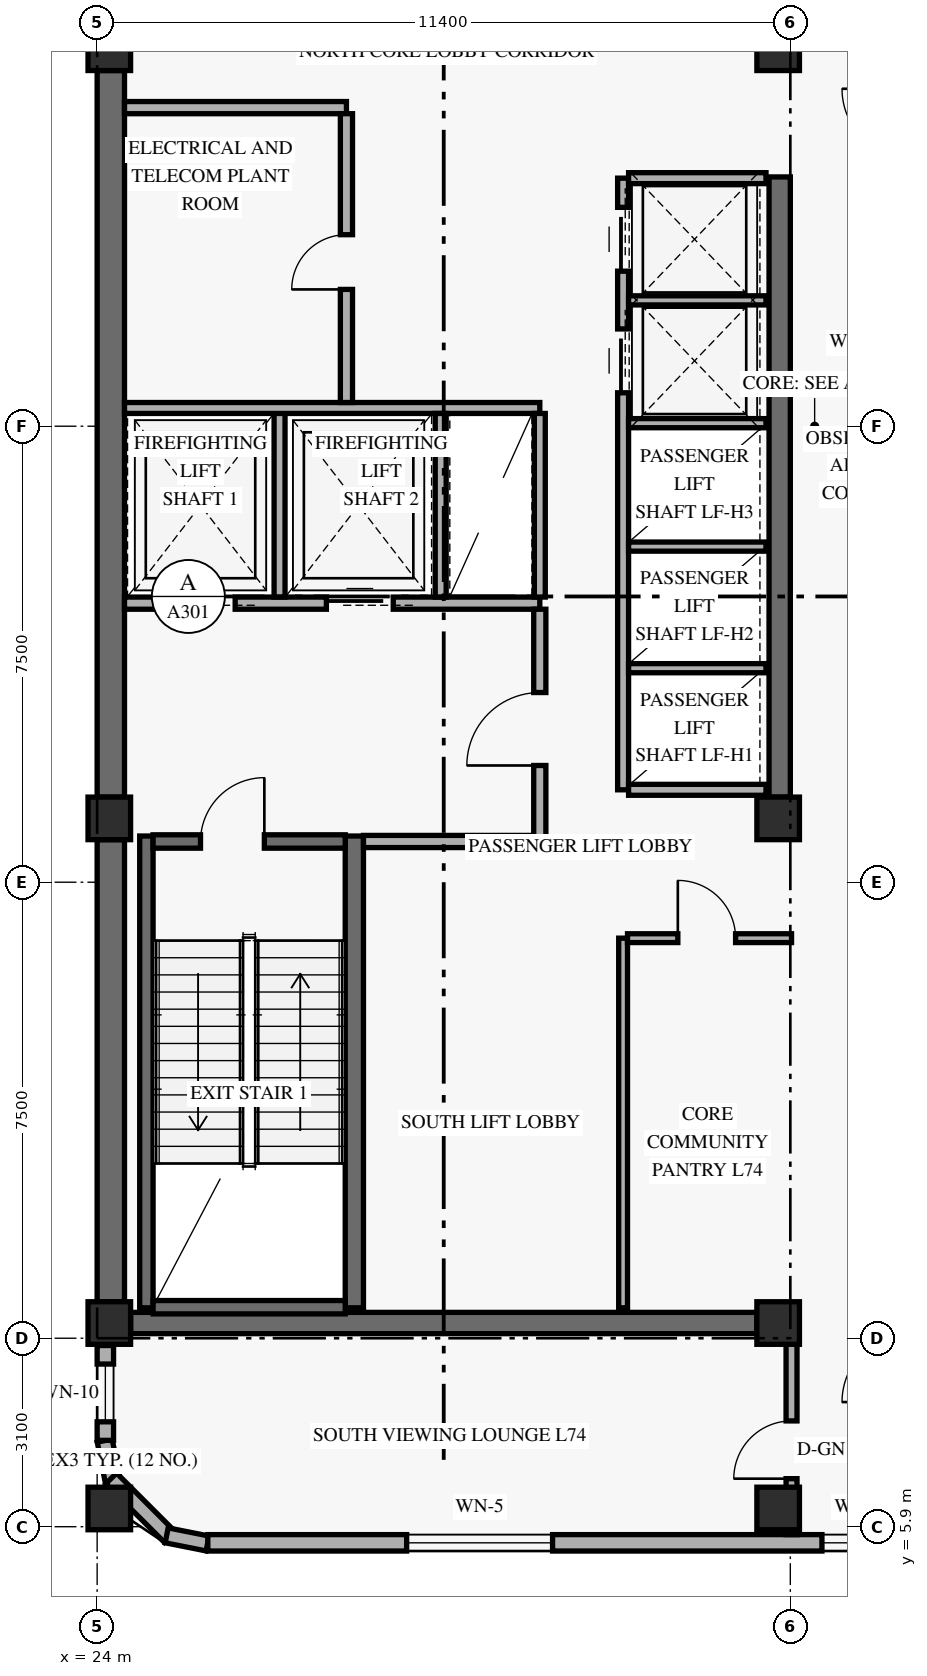
"""IFC4 building model, lengths in metres.
Left out: names, types, materials, properties, quantities, classifications, styles, units other than length and angle.
Written with IfcOpenShell. Run it as: python <this file> out.ifc"""

import sys

from ifc_helpers import new_model, si_unit, direction, frame, frame_2d, origin, origin_2d, place, context, subcontext, project, spatial, rectangle, extrude, element, fill, save


model = new_model("IFC4")
c1 = context("Model", 3, precision=1e-05, world=origin(), true_north=direction((0.0, 1.0)))
c2 = subcontext(c1, "Body", "Model", "MODEL_VIEW")
j1 = project(units=[si_unit("LENGTHUNIT", "METRE"), si_unit("PLANEANGLEUNIT", "RADIAN")], contexts=[c1])
p1 = place(None, origin())
s1 = spatial("IfcSite", under=j1, at=p1, CompositionType="ELEMENT")
p2 = place(p1, origin())
s2 = spatial("IfcBuilding", under=s1, at=p2, CompositionType="ELEMENT")
p3 = place(p2, frame((0.0, 0.0, 282.0)))
s3 = spatial("IfcBuildingStorey", under=s2, at=p3, CompositionType="ELEMENT", Elevation=282.0)
p4 = place(p3, frame((24.225, 9.6, 0.0), z_axis=(0.0, 0.0, 1.0), x_axis=(0.0, 1.0, 0.0)))
e1 = element("IfcWall", 1, at=p4, inside=s3, PredefinedType="SHEAR", context=c2, shape_type="SweptSolid", body=[
    extrude(rectangle(XDim=7.6, YDim=0.45, at=frame_2d((3.8, 0.0))), origin(), (0.0, 0.0, 1.0), 4.161),
])
p5 = place(p3, frame((24.225, 17.9, 0.0), z_axis=(0.0, 0.0, 1.0), x_axis=(0.0, 1.0, 0.0)))
e2 = element("IfcWall", 2, at=p5, inside=s3, PredefinedType="SHEAR", context=c2, shape_type="SweptSolid", body=[
    extrude(rectangle(XDim=11.95, YDim=0.45, at=frame_2d((5.975, 0.0))), origin(), (0.0, 0.0, 1.0), 4.161),
])
p6 = place(p3, frame((35.225, 17.9, 0.0), z_axis=(0.0, 0.0, 1.0), x_axis=(0.0, 1.0, 0.0)))
e3 = element("IfcWall", 3, at=p6, inside=s3, PredefinedType="SHEAR", context=c2, shape_type="SweptSolid", body=[
    extrude(rectangle(XDim=10.2, YDim=0.35, at=frame_2d((5.1, 0.0))), origin(), (0.0, 0.0, 1.0), 4.161),
])
p7 = place(p3, frame((24.55, 9.25, 0.0), z_axis=(0.0, 0.0, 1.0), x_axis=(1.0, 0.0, 0.0)))
e4 = element("IfcWall", 4, at=p7, inside=s3, PredefinedType="SHEAR", context=c2, shape_type="SweptSolid", body=[
    extrude(rectangle(XDim=10.3, YDim=0.35, at=frame_2d((5.15, 0.0))), origin(), (0.0, 0.0, 1.0), 4.7),
])
p8 = place(p3, frame((24.81, 9.5, 0.0), z_axis=(0.0, 0.0, 1.0), x_axis=(0.0, 1.0, 0.0)))
e5 = element("IfcWall", 5, at=p8, inside=s3, PredefinedType="SHEAR", context=c2, shape_type="SweptSolid", body=[
    extrude(rectangle(XDim=7.76, YDim=0.22, at=frame_2d((3.88, 0.0))), origin(), (0.0, 0.0, 1.0), 4.7),
])
p9 = place(p3, frame((28.23, 9.5, 0.0), z_axis=(0.0, 0.0, 1.0), x_axis=(0.0, 1.0, 0.0)))
e6 = element("IfcWall", 6, at=p9, inside=s3, PredefinedType="SHEAR", context=c2, shape_type="SweptSolid", body=[
    extrude(rectangle(XDim=7.76, YDim=0.3, at=frame_2d((3.88, 0.0))), origin(), (0.0, 0.0, 1.0), 4.7),
])
p10 = place(p3, frame((24.92, 9.51, 0.0), z_axis=(0.0, 0.0, 1.0), x_axis=(1.0, 0.0, 0.0)))
e7 = element("IfcWall", 7, at=p10, inside=s3, PredefinedType="SHEAR", context=c2, shape_type="SweptSolid", body=[
    extrude(rectangle(XDim=3.16, YDim=0.22, at=frame_2d((1.58, 0.0))), origin(), (0.0, 0.0, 1.0), 4.7),
])
p11 = place(p3, frame((24.92, 17.17, 0.0), z_axis=(0.0, 0.0, 1.0), x_axis=(1.0, 0.0, 0.0)))
e8 = element("IfcWall", 8, at=p11, inside=s3, PredefinedType="SHEAR", context=c2, shape_type="SweptSolid", body=[
    extrude(rectangle(XDim=3.16, YDim=0.22, at=frame_2d((1.58, 0.0))), origin(), (0.0, 0.0, 1.0), 4.7),
])
p12 = place(p11, frame((0.78, 0.0, 0.0)))
e9 = element("IfcOpeningElement", 9, at=p12, cuts=e8, PredefinedType="OPENING", context=c2, shape_type="SweptSolid", body=[
    extrude(rectangle(XDim=1.05, YDim=2.15, at=frame_2d((0.525, 1.075))), frame((0.0, 0.12, 0.0), z_axis=(0.0, -1.0, 0.0), x_axis=(1.0, 0.0, 0.0)), (0.0, 0.0, 1.0), 0.24),
])
for number, where, z_axis, x_axis in (
    (10, (24.2, 6.2, 0.0), (0.0, 0.0, 1.0), (1.0, 0.0, 0.0)),
    (11, (24.2, 9.25, 0.0), (0.0, 0.0, 1.0), (1.0, 0.0, 0.0)),
    (12, (24.2, 17.55, 0.0), (0.0, 0.0, 1.0), (1.0, 0.0, 0.0)),
    (13, (24.2, 30.2, 0.0), (0.0, 0.0, 1.0), (1.0, 0.0, 0.0)),
    (14, (35.2, 6.2, 0.0), (0.0, 0.0, 1.0), (1.0, 0.0, 0.0)),
    (15, (35.2, 9.25, 0.0), (0.0, 0.0, 1.0), (1.0, 0.0, 0.0)),
    (16, (35.2, 17.55, 0.0), (0.0, 0.0, 1.0), (1.0, 0.0, 0.0)),
    (17, (35.2, 30.2, 0.0), (0.0, 0.0, 1.0), (1.0, 0.0, 0.0)),
):
    element("IfcColumn", number, at=place(p3, frame(where, z_axis=z_axis, x_axis=x_axis)), inside=s3, PredefinedType="COLUMN", context=c2, shape_type="SweptSolid", body=[
        extrude(rectangle(XDim=0.7, YDim=0.7, at=origin_2d()), origin(), (0.0, 0.0, 1.0), 5.0),
    ])
p13 = place(p3, frame((24.124, 7.316, 0.0), z_axis=(0.0, 0.0, 1.0), x_axis=(0.194952956674, -0.980812594069, 0.0)))
e18 = element("IfcWall", 18, at=p13, inside=s3, PredefinedType="SOLIDWALL", context=c2, shape_type="SweptSolid", body=[
    extrude(rectangle(XDim=0.686, YDim=0.25, at=frame_2d((0.343, 0.0))), origin(), (0.0, 0.0, 1.0), 4.143),
])
p14 = place(p3, frame((24.231, 6.694, 0.0), z_axis=(0.0, 0.0, 1.0), x_axis=(0.707106781187, -0.707106781187, 0.0)))
e19 = element("IfcWall", 19, at=p14, inside=s3, PredefinedType="SOLIDWALL", context=c2, shape_type="SweptSolid", body=[
    extrude(rectangle(XDim=1.362, YDim=0.25, at=frame_2d((0.681, 0.0))), origin(), (0.0, 0.0, 1.0), 4.143),
])
p15 = place(p3, frame((25.143, 5.758, 0.0), z_axis=(0.0, 0.0, 1.0), x_axis=(0.980812594069, -0.194952956674, 0.0)))
e20 = element("IfcWall", 20, at=p15, inside=s3, PredefinedType="SOLIDWALL", context=c2, shape_type="SweptSolid", body=[
    extrude(rectangle(XDim=0.686, YDim=0.25, at=frame_2d((0.343, 0.0))), origin(), (0.0, 0.0, 1.0), 4.7),
])
p16 = place(p3, frame((25.82, 5.635, 0.0), z_axis=(0.0, 0.0, 1.0), x_axis=(1.0, 0.0, 0.0)))
e21 = element("IfcWall", 21, at=p16, inside=s3, PredefinedType="SOLIDWALL", context=c2, shape_type="SweptSolid", body=[
    extrude(rectangle(XDim=32.96, YDim=0.27, at=frame_2d((16.48, 0.0))), origin(), (0.0, 0.0, 1.0), 4.7),
])
p17 = place(p16, frame((3.27, 0.0, 0.85)))
e22 = element("IfcOpeningElement", 22, at=p17, cuts=e21, PredefinedType="OPENING", context=c2, shape_type="SweptSolid", body=[
    extrude(rectangle(XDim=2.4, YDim=1.9, at=frame_2d((1.2, 0.95))), frame((0.0, 0.145, 0.0), z_axis=(0.0, -1.0, 0.0), x_axis=(1.0, 0.0, 0.0)), (0.0, 0.0, 1.0), 0.29),
])
p18 = place(p16, frame((10.1, 0.0, 0.85)))
e23 = element("IfcOpeningElement", 23, at=p18, cuts=e21, PredefinedType="OPENING", context=c2, shape_type="SweptSolid", body=[
    extrude(rectangle(XDim=1.2, YDim=1.5, at=frame_2d((0.6, 0.75))), frame((0.0, 0.145, 0.0), z_axis=(0.0, -1.0, 0.0), x_axis=(1.0, 0.0, 0.0)), (0.0, 0.0, 1.0), 0.29),
])
p19 = place(p16, frame((16.407, 0.0, 0.85)))
e24 = element("IfcOpeningElement", 24, at=p19, cuts=e21, PredefinedType="OPENING", context=c2, shape_type="SweptSolid", body=[
    extrude(rectangle(XDim=2.4, YDim=1.9, at=frame_2d((1.2, 0.95))), frame((0.0, 0.145, 0.0), z_axis=(0.0, -1.0, 0.0), x_axis=(1.0, 0.0, 0.0)), (0.0, 0.0, 1.0), 0.29),
])
p20 = place(p3, frame((24.135, 7.32, 0.0), z_axis=(0.0, 0.0, 1.0), x_axis=(0.0, 1.0, 0.0)))
e25 = element("IfcWall", 25, at=p20, inside=s3, PredefinedType="SOLIDWALL", context=c2, shape_type="SweptSolid", body=[
    extrude(rectangle(XDim=1.56, YDim=0.27, at=frame_2d((0.78, 0.0))), origin(), (0.0, 0.0, 1.0), 4.143),
])
p21 = place(p20, frame((0.305, 0.0, 0.85)))
e26 = element("IfcOpeningElement", 26, at=p21, cuts=e25, PredefinedType="OPENING", context=c2, shape_type="SweptSolid", body=[
    extrude(rectangle(XDim=0.95, YDim=1.5, at=frame_2d((0.475, 0.75))), frame((0.0, 0.145, 0.0), z_axis=(0.0, -1.0, 0.0), x_axis=(1.0, 0.0, 0.0)), (0.0, 0.0, 1.0), 0.29),
])
p22 = place(p3, frame((24.45, 21.09, 0.0), z_axis=(0.0, 0.0, 1.0), x_axis=(1.0, 0.0, 0.0)))
e27 = element("IfcWall", 27, at=p22, inside=s3, PredefinedType="STANDARD", context=c2, shape_type="SweptSolid", body=[
    extrude(rectangle(XDim=6.83, YDim=0.2, at=frame_2d((3.415, 0.0))), origin(), (0.0, 0.0, 1.0), 4.7),
])
p23 = place(p22, frame((0.72, 0.0, 0.0)))
e28 = element("IfcOpeningElement", 28, at=p23, cuts=e27, PredefinedType="OPENING", context=c2, shape_type="SweptSolid", body=[
    extrude(rectangle(XDim=1.1, YDim=2.2, at=frame_2d((0.55, 1.1))), frame((0.0, 0.11, 0.0), z_axis=(0.0, -1.0, 0.0), x_axis=(1.0, 0.0, 0.0)), (0.0, 0.0, 1.0), 0.22),
])
p24 = place(p22, frame((3.32, 0.0, 0.0)))
e29 = element("IfcOpeningElement", 29, at=p24, cuts=e27, PredefinedType="OPENING", context=c2, shape_type="SweptSolid", body=[
    extrude(rectangle(XDim=1.1, YDim=2.2, at=frame_2d((0.55, 1.1))), frame((0.0, 0.11, 0.0), z_axis=(0.0, -1.0, 0.0), x_axis=(1.0, 0.0, 0.0)), (0.0, 0.0, 1.0), 0.22),
])
p25 = place(p3, frame((28.38, 17.17, 0.0), z_axis=(0.0, 0.0, 1.0), x_axis=(1.0, 0.0, 0.0)))
e30 = element("IfcWall", 30, at=p25, inside=s3, PredefinedType="STANDARD", context=c2, shape_type="SweptSolid", body=[
    extrude(rectangle(XDim=2.9, YDim=0.2, at=frame_2d((1.45, 0.0))), origin(), (0.0, 0.0, 1.0), 4.7),
])
p26 = place(p3, frame((31.28, 17.07, 0.0), z_axis=(0.0, 0.0, 1.0), x_axis=(0.0, 1.0, 0.0)))
e31 = element("IfcWall", 31, at=p26, inside=s3, PredefinedType="STANDARD", context=c2, shape_type="SweptSolid", body=[
    extrude(rectangle(XDim=3.92, YDim=0.2, at=frame_2d((1.96, 0.0))), origin(), (0.0, 0.0, 1.0), 4.143),
])
p27 = place(p26, frame((1.35, 0.0, 0.0)))
e32 = element("IfcOpeningElement", 32, at=p27, cuts=e31, PredefinedType="OPENING", context=c2, shape_type="SweptSolid", body=[
    extrude(rectangle(XDim=1.2, YDim=2.15, at=frame_2d((0.6, 1.075))), frame((0.0, 0.11, 0.0), z_axis=(0.0, -1.0, 0.0), x_axis=(1.0, 0.0, 0.0)), (0.0, 0.0, 1.0), 0.22),
])
p28 = place(p3, frame((27.0, 21.19, 0.0), z_axis=(0.0, 0.0, 1.0), x_axis=(0.0, 1.0, 0.0)))
e33 = element("IfcWall", 33, at=p28, inside=s3, PredefinedType="STANDARD", context=c2, shape_type="SweptSolid", body=[
    extrude(rectangle(XDim=3.11, YDim=0.18, at=frame_2d((1.555, 0.0))), origin(), (0.0, 0.0, 1.0), 4.7),
])
p29 = place(p3, frame((24.45, 24.3, 0.0), z_axis=(0.0, 0.0, 1.0), x_axis=(1.0, 0.0, 0.0)))
e34 = element("IfcWall", 34, at=p29, inside=s3, PredefinedType="STANDARD", context=c2, shape_type="SweptSolid", body=[
    extrude(rectangle(XDim=6.83, YDim=0.18, at=frame_2d((3.415, 0.0))), origin(), (0.0, 0.0, 1.0), 4.7),
])
for number, where, z_axis, x_axis in (
    (35, (29.65, 21.19, 0.0), (0.0, 0.0, 1.0), (0.0, 1.0, 0.0)),
    (36, (31.28, 21.19, 0.0), (0.0, 0.0, 1.0), (0.0, 1.0, 0.0)),
):
    element("IfcWall", number, at=place(p3, frame(where, z_axis=z_axis, x_axis=x_axis)), inside=s3, PredefinedType="STANDARD", context=c2, shape_type="SweptSolid", body=[
        extrude(rectangle(XDim=3.02, YDim=0.18, at=frame_2d((1.51, 0.0))), origin(), (0.0, 0.0, 1.0), 4.7),
    ])
p30 = place(p3, frame((24.45, 29.24, 0.0), z_axis=(0.0, 0.0, 1.0), x_axis=(1.0, 0.0, 0.0)))
e37 = element("IfcWall", 37, at=p30, inside=s3, PredefinedType="STANDARD", context=c2, shape_type="SweptSolid", body=[
    extrude(rectangle(XDim=3.65, YDim=0.2, at=frame_2d((1.825, 0.0))), origin(), (0.0, 0.0, 1.0), 4.7),
])
p31 = place(p3, frame((28.1, 24.39, 0.0), z_axis=(0.0, 0.0, 1.0), x_axis=(0.0, 1.0, 0.0)))
e38 = element("IfcWall", 38, at=p31, inside=s3, PredefinedType="STANDARD", context=c2, shape_type="SweptSolid", body=[
    extrude(rectangle(XDim=4.75, YDim=0.2, at=frame_2d((2.375, 0.0))), origin(), (0.0, 0.0, 1.0), 4.7),
])
p32 = place(p31, frame((1.86, 0.0, 0.0)))
e39 = element("IfcOpeningElement", 39, at=p32, cuts=e38, PredefinedType="OPENING", context=c2, shape_type="SweptSolid", body=[
    extrude(rectangle(XDim=0.9, YDim=2.1, at=frame_2d((0.45, 1.05))), frame((0.0, 0.11, 0.0), z_axis=(0.0, -1.0, 0.0), x_axis=(1.0, 0.0, 0.0)), (0.0, 0.0, 1.0), 0.22),
])
p33 = place(p3, frame((32.65, 18.02, 0.0), z_axis=(0.0, 0.0, 1.0), x_axis=(0.0, 1.0, 0.0)))
e40 = element("IfcWall", 40, at=p33, inside=s3, PredefinedType="STANDARD", context=c2, shape_type="SweptSolid", body=[
    extrude(rectangle(XDim=10.06, YDim=0.18, at=frame_2d((5.03, 0.0))), origin(), (0.0, 0.0, 1.0), 4.7),
])
p34 = place(p33, frame((6.53, 0.0, 0.0)))
e41 = element("IfcOpeningElement", 41, at=p34, cuts=e40, PredefinedType="OPENING", context=c2, shape_type="SweptSolid", body=[
    extrude(rectangle(XDim=1.05, YDim=2.2, at=frame_2d((0.525, 1.1))), frame((0.0, 0.1, 0.0), z_axis=(0.0, -1.0, 0.0), x_axis=(1.0, 0.0, 0.0)), (0.0, 0.0, 1.0), 0.2),
])
p35 = place(p33, frame((8.53, 0.0, 0.0)))
e42 = element("IfcOpeningElement", 42, at=p35, cuts=e40, PredefinedType="OPENING", context=c2, shape_type="SweptSolid", body=[
    extrude(rectangle(XDim=1.05, YDim=2.2, at=frame_2d((0.525, 1.1))), frame((0.0, 0.1, 0.0), z_axis=(0.0, -1.0, 0.0), x_axis=(1.0, 0.0, 0.0)), (0.0, 0.0, 1.0), 0.2),
])
for number, where, z_axis, x_axis in (
    (43, (32.74, 18.02, 0.0), (0.0, 0.0, 1.0), (1.0, 0.0, 0.0)),
    (44, (32.74, 28.08, 0.0), (0.0, 0.0, 1.0), (1.0, 0.0, 0.0)),
):
    element("IfcWall", number, at=place(p3, frame(where, z_axis=z_axis, x_axis=x_axis)), inside=s3, PredefinedType="STANDARD", context=c2, shape_type="SweptSolid", body=[
        extrude(rectangle(XDim=2.26, YDim=0.18, at=frame_2d((1.13, 0.0))), origin(), (0.0, 0.0, 1.0), 4.7),
    ])
for number, where, z_axis, x_axis in (
    (45, (32.74, 20.02, 0.0), (0.0, 0.0, 1.0), (1.0, 0.0, 0.0)),
    (46, (32.74, 22.02, 0.0), (0.0, 0.0, 1.0), (1.0, 0.0, 0.0)),
    (47, (32.74, 24.05, 0.0), (0.0, 0.0, 1.0), (1.0, 0.0, 0.0)),
    (48, (32.74, 26.07, 0.0), (0.0, 0.0, 1.0), (1.0, 0.0, 0.0)),
):
    element("IfcWall", number, at=place(p3, frame(where, z_axis=z_axis, x_axis=x_axis)), inside=s3, PredefinedType="STANDARD", context=c2, shape_type="SweptSolid", body=[
        extrude(rectangle(XDim=2.26, YDim=0.15, at=frame_2d((1.13, 0.0))), origin(), (0.0, 0.0, 1.0), 4.7),
    ])
p36 = place(p3, frame((35.42, 5.77, 0.0), z_axis=(0.0, 0.0, 1.0), x_axis=(0.0, 1.0, 0.0)))
e49 = element("IfcWall", 49, at=p36, inside=s3, PredefinedType="STANDARD", context=c2, shape_type="SweptSolid", body=[
    extrude(rectangle(XDim=3.48, YDim=0.18, at=frame_2d((1.74, 0.0))), origin(), (0.0, 0.0, 1.0), 4.143),
])
p37 = place(p36, frame((0.92, 0.0, 0.0)))
e50 = element("IfcOpeningElement", 50, at=p37, cuts=e49, PredefinedType="OPENING", context=c2, shape_type="SweptSolid", body=[
    extrude(rectangle(XDim=0.95, YDim=2.15, at=frame_2d((0.475, 1.075))), frame((0.0, 0.1, 0.0), z_axis=(0.0, -1.0, 0.0), x_axis=(1.0, 0.0, 0.0)), (0.0, 0.0, 1.0), 0.2),
])
p38 = place(p3, frame((32.65, 9.5, 0.0), z_axis=(0.0, 0.0, 1.0), x_axis=(0.0, 1.0, 0.0)))
e51 = element("IfcWall", 51, at=p38, inside=s3, PredefinedType="PARTITIONING", context=c2, shape_type="SweptSolid", body=[
    extrude(rectangle(XDim=6.08, YDim=0.145, at=frame_2d((3.04, 0.0))), origin(), (0.0, 0.0, 1.0), 4.7),
])
p39 = place(p3, frame((32.722, 15.58, 0.0), z_axis=(0.0, 0.0, 1.0), x_axis=(1.0, 0.0, 0.0)))
e52 = element("IfcWall", 52, at=p39, inside=s3, PredefinedType="PARTITIONING", context=c2, shape_type="SweptSolid", body=[
    extrude(rectangle(XDim=2.698, YDim=0.145, at=frame_2d((1.349, 0.0))), origin(), (0.0, 0.0, 1.0), 4.143),
])
p40 = place(p39, frame((0.827, 0.0, 0.0)))
e53 = element("IfcOpeningElement", 53, at=p40, cuts=e52, PredefinedType="OPENING", context=c2, shape_type="SweptSolid", body=[
    extrude(rectangle(XDim=0.95, YDim=2.15, at=frame_2d((0.475, 1.075))), frame((0.0, 0.083, 0.0), z_axis=(0.0, -1.0, 0.0), x_axis=(1.0, 0.0, 0.0)), (0.0, 0.0, 1.0), 0.165),
])
p41 = place(p17, origin())
e54 = element("IfcWindow", 54, at=p41, inside=s3, PartitioningType="SINGLE_PANEL", PredefinedType="WINDOW", context=c2, shape_type="SweptSolid", body=[
    extrude(rectangle(XDim=2.4, YDim=1.9, at=frame_2d((1.2, 0.95))), frame((0.0, 0.03, 0.0), z_axis=(0.0, -1.0, 0.0), x_axis=(1.0, 0.0, 0.0)), (0.0, 0.0, 1.0), 0.06),
])
fill(e22, e54)
p42 = place(p18, origin())
e55 = element("IfcWindow", 55, at=p42, inside=s3, PartitioningType="SINGLE_PANEL", PredefinedType="WINDOW", context=c2, shape_type="SweptSolid", body=[
    extrude(rectangle(XDim=1.2, YDim=1.5, at=frame_2d((0.6, 0.75))), frame((0.0, 0.03, 0.0), z_axis=(0.0, -1.0, 0.0), x_axis=(1.0, 0.0, 0.0)), (0.0, 0.0, 1.0), 0.06),
])
fill(e23, e55)
p43 = place(p21, origin())
e56 = element("IfcWindow", 56, at=p43, inside=s3, PartitioningType="SINGLE_PANEL", PredefinedType="WINDOW", context=c2, shape_type="SweptSolid", body=[
    extrude(rectangle(XDim=0.95, YDim=1.5, at=frame_2d((0.475, 0.75))), frame((0.0, 0.03, 0.0), z_axis=(0.0, -1.0, 0.0), x_axis=(1.0, 0.0, 0.0)), (0.0, 0.0, 1.0), 0.06),
])
fill(e26, e56)
p44 = place(p12, frame((1.05, 0.0, 0.0), z_axis=(0.0, 0.0, 1.0), x_axis=(-1.0, 0.0, 0.0)))
e57 = element("IfcDoor", 57, at=p44, inside=s3, OperationType="SINGLE_SWING_LEFT", PredefinedType="DOOR", context=c2, shape_type="SweptSolid", body=[
    extrude(rectangle(XDim=1.05, YDim=2.15, at=frame_2d((0.525, 1.075))), frame((0.0, 0.025, 0.0), z_axis=(0.0, -1.0, 0.0), x_axis=(1.0, 0.0, 0.0)), (0.0, 0.0, 1.0), 0.05),
])
fill(e9, e57)
p45 = place(p23, origin())
e58 = element("IfcDoor", 58, at=p45, inside=s3, OperationType="SLIDING_TO_LEFT", PredefinedType="DOOR", context=c2, shape_type="SweptSolid", body=[
    extrude(rectangle(XDim=1.1, YDim=2.2, at=frame_2d((0.55, 1.1))), frame((0.0, 0.025, 0.0), z_axis=(0.0, -1.0, 0.0), x_axis=(1.0, 0.0, 0.0)), (0.0, 0.0, 1.0), 0.05),
])
fill(e28, e58)
p46 = place(p24, origin())
e59 = element("IfcDoor", 59, at=p46, inside=s3, OperationType="SLIDING_TO_LEFT", PredefinedType="DOOR", context=c2, shape_type="SweptSolid", body=[
    extrude(rectangle(XDim=1.1, YDim=2.2, at=frame_2d((0.55, 1.1))), frame((0.0, 0.025, 0.0), z_axis=(0.0, -1.0, 0.0), x_axis=(1.0, 0.0, 0.0)), (0.0, 0.0, 1.0), 0.05),
])
fill(e29, e59)
p47 = place(p27, origin())
e60 = element("IfcDoor", 60, at=p47, inside=s3, OperationType="SINGLE_SWING_LEFT", PredefinedType="DOOR", context=c2, shape_type="SweptSolid", body=[
    extrude(rectangle(XDim=1.2, YDim=2.15, at=frame_2d((0.6, 1.075))), frame((0.0, 0.025, 0.0), z_axis=(0.0, -1.0, 0.0), x_axis=(1.0, 0.0, 0.0)), (0.0, 0.0, 1.0), 0.05),
])
fill(e32, e60)
p48 = place(p32, origin())
e61 = element("IfcDoor", 61, at=p48, inside=s3, OperationType="SINGLE_SWING_LEFT", PredefinedType="DOOR", context=c2, shape_type="SweptSolid", body=[
    extrude(rectangle(XDim=0.9, YDim=2.1, at=frame_2d((0.45, 1.05))), frame((0.0, 0.025, 0.0), z_axis=(0.0, -1.0, 0.0), x_axis=(1.0, 0.0, 0.0)), (0.0, 0.0, 1.0), 0.05),
])
fill(e39, e61)
p49 = place(p34, origin())
e62 = element("IfcDoor", 62, at=p49, inside=s3, OperationType="SLIDING_TO_LEFT", PredefinedType="DOOR", context=c2, shape_type="SweptSolid", body=[
    extrude(rectangle(XDim=1.05, YDim=2.2, at=frame_2d((0.525, 1.1))), frame((0.0, 0.025, 0.0), z_axis=(0.0, -1.0, 0.0), x_axis=(1.0, 0.0, 0.0)), (0.0, 0.0, 1.0), 0.05),
])
fill(e41, e62)
p50 = place(p35, origin())
e63 = element("IfcDoor", 63, at=p50, inside=s3, OperationType="SLIDING_TO_LEFT", PredefinedType="DOOR", context=c2, shape_type="SweptSolid", body=[
    extrude(rectangle(XDim=1.05, YDim=2.2, at=frame_2d((0.525, 1.1))), frame((0.0, 0.025, 0.0), z_axis=(0.0, -1.0, 0.0), x_axis=(1.0, 0.0, 0.0)), (0.0, 0.0, 1.0), 0.05),
])
fill(e42, e63)
p51 = place(p40, origin())
e64 = element("IfcDoor", 64, at=p51, inside=s3, OperationType="SINGLE_SWING_LEFT", PredefinedType="DOOR", context=c2, shape_type="SweptSolid", body=[
    extrude(rectangle(XDim=0.95, YDim=2.15, at=frame_2d((0.475, 1.075))), frame((0.0, 0.025, 0.0), z_axis=(0.0, -1.0, 0.0), x_axis=(1.0, 0.0, 0.0)), (0.0, 0.0, 1.0), 0.05),
])
fill(e53, e64)
p52 = place(p37, origin())
e65 = element("IfcDoor", 65, at=p52, inside=s3, OperationType="SINGLE_SWING_LEFT", PredefinedType="DOOR", context=c2, shape_type="SweptSolid", body=[
    extrude(rectangle(XDim=0.95, YDim=2.15, at=frame_2d((0.475, 1.075))), frame((0.0, 0.025, 0.0), z_axis=(0.0, -1.0, 0.0), x_axis=(1.0, 0.0, 0.0)), (0.0, 0.0, 1.0), 0.05),
])
fill(e50, e65)
save(model, sys.argv[1])
